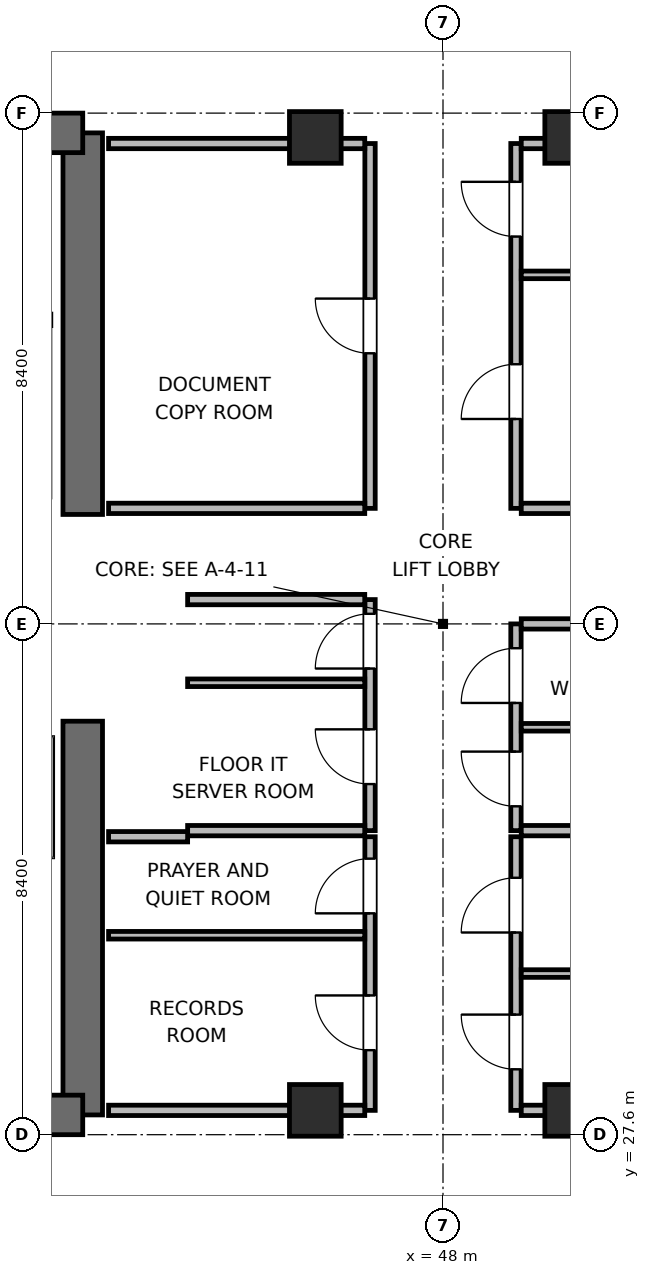
"""IFC4 building model, lengths in metres.
Left out: names, types, materials, properties, quantities, classifications, styles, units other than length and angle.
Written with IfcOpenShell. Run it as: python <this file> out.ifc"""

import sys

from ifc_helpers import new_model, si_unit, direction, frame, frame_2d, origin, origin_2d, place, context, subcontext, project, spatial, rectangle, extrude, element, fill, save


model = new_model("IFC4")
c1 = context("Model", 3, precision=1e-05, world=origin(), true_north=direction((0.0, 1.0)))
c2 = subcontext(c1, "Body", "Model", "MODEL_VIEW")
j1 = project(units=[si_unit("LENGTHUNIT", "METRE"), si_unit("PLANEANGLEUNIT", "RADIAN")], contexts=[c1])
p1 = place(None, origin())
s1 = spatial("IfcSite", under=j1, at=p1, CompositionType="ELEMENT")
p2 = place(p1, origin())
s2 = spatial("IfcBuilding", under=s1, at=p2, CompositionType="ELEMENT")
p3 = place(p2, frame((0.0, 0.0, 231.0)))
s3 = spatial("IfcBuildingStorey", under=s2, at=p3, CompositionType="ELEMENT", Elevation=231.0)
p4 = place(p3, frame((42.075, 27.925, 0.0), z_axis=(0.0, 0.0, 1.0), x_axis=(0.0, 1.0, 0.0)))
e1 = element("IfcWall", 1, at=p4, inside=s3, PredefinedType="SHEAR", context=c2, shape_type="SweptSolid", body=[
    extrude(rectangle(XDim=6.475, YDim=0.65, at=frame_2d((3.237, 0.0))), origin(), (0.0, 0.0, 1.0), 3.9),
])
p5 = place(p3, frame((42.075, 37.8, 0.0), z_axis=(0.0, 0.0, 1.0), x_axis=(0.0, 1.0, 0.0)))
e2 = element("IfcWall", 2, at=p5, inside=s3, PredefinedType="SHEAR", context=c2, shape_type="SweptSolid", body=[
    extrude(rectangle(XDim=6.275, YDim=0.65, at=frame_2d((3.137, 0.0))), origin(), (0.0, 0.0, 1.0), 3.9),
])
p6 = place(p3, frame((32.725, 27.925, 0.0), z_axis=(0.0, 0.0, 1.0), x_axis=(1.0, 0.0, 0.0)))
e3 = element("IfcWall", 3, at=p6, inside=s3, PredefinedType="SHEAR", context=c2, shape_type="SweptSolid", body=[
    extrude(rectangle(XDim=9.35, YDim=0.65, at=frame_2d((4.675, 0.0))), origin(), (0.0, 0.0, 1.0), 3.9),
])
p7 = place(p6, frame((5.025, 0.0, 0.0)))
e4 = element("IfcOpeningElement", 4, at=p7, cuts=e3, PredefinedType="OPENING", context=c2, shape_type="SweptSolid", body=[
    extrude(rectangle(XDim=1.05, YDim=2.04, at=frame_2d((0.525, 1.02))), frame((0.0, 0.335, 0.0), z_axis=(0.0, -1.0, 0.0), x_axis=(1.0, 0.0, 0.0)), (0.0, 0.0, 1.0), 0.67),
])
p8 = place(p3, frame((32.725, 44.075, 0.0), z_axis=(0.0, 0.0, 1.0), x_axis=(1.0, 0.0, 0.0)))
e5 = element("IfcWall", 5, at=p8, inside=s3, PredefinedType="SHEAR", context=c2, shape_type="SweptSolid", body=[
    extrude(rectangle(XDim=9.35, YDim=0.65, at=frame_2d((4.675, 0.0))), origin(), (0.0, 0.0, 1.0), 3.9),
])
p9 = place(p8, frame((1.025, 0.0, 0.0)))
e6 = element("IfcOpeningElement", 6, at=p9, cuts=e5, PredefinedType="OPENING", context=c2, shape_type="SweptSolid", body=[
    extrude(rectangle(XDim=0.95, YDim=2.04, at=frame_2d((0.475, 1.02))), frame((0.0, 0.335, 0.0), z_axis=(0.0, -1.0, 0.0), x_axis=(1.0, 0.0, 0.0)), (0.0, 0.0, 1.0), 0.67),
])
p10 = place(p8, frame((4.275, 0.0, 0.0)))
e7 = element("IfcOpeningElement", 7, at=p10, cuts=e5, PredefinedType="OPENING", context=c2, shape_type="SweptSolid", body=[
    extrude(rectangle(XDim=0.9, YDim=2.02, at=frame_2d((0.45, 1.01))), frame((0.0, 0.335, 0.0), z_axis=(0.0, -1.0, 0.0), x_axis=(1.0, 0.0, 0.0)), (0.0, 0.0, 1.0), 0.67),
])
p11 = place(p8, frame((7.175, 0.0, 0.0)))
e8 = element("IfcOpeningElement", 8, at=p11, cuts=e5, PredefinedType="OPENING", context=c2, shape_type="SweptSolid", body=[
    extrude(rectangle(XDim=0.9, YDim=2.02, at=frame_2d((0.45, 1.01))), frame((0.0, 0.335, 0.0), z_axis=(0.0, -1.0, 0.0), x_axis=(1.0, 0.0, 0.0)), (0.0, 0.0, 1.0), 0.67),
])
for number, where, z_axis, x_axis in (
    (9, (45.9, 28.0, 0.0), (0.0, 0.0, 1.0), (1.0, 0.0, 0.0)),
    (10, (50.1, 28.0, 0.0), (0.0, 0.0, 1.0), (1.0, 0.0, 0.0)),
    (11, (45.9, 44.0, 0.0), (0.0, 0.0, 1.0), (1.0, 0.0, 0.0)),
    (12, (50.1, 44.0, 0.0), (0.0, 0.0, 1.0), (1.0, 0.0, 0.0)),
):
    element("IfcColumn", number, at=place(p3, frame(where, z_axis=z_axis, x_axis=x_axis)), inside=s3, PredefinedType="COLUMN", context=c2, shape_type="SweptSolid", body=[
        extrude(rectangle(XDim=0.85, YDim=0.85, at=origin_2d()), origin(), (0.0, 0.0, 1.0), 3.9),
    ])
p12 = place(p3, frame((46.8, 32.6, 0.0), z_axis=(0.0, 0.0, 1.0), x_axis=(0.0, 1.0, 0.0)))
e13 = element("IfcWall", 13, at=p12, inside=s3, PredefinedType="PARTITIONING", context=c2, shape_type="SweptSolid", body=[
    extrude(rectangle(XDim=3.8, YDim=0.17, at=frame_2d((1.9, 0.0))), origin(), (0.0, 0.0, 1.0), 3.68),
])
p13 = place(p12, frame((0.766, 0.0, 0.0)))
e14 = element("IfcOpeningElement", 14, at=p13, cuts=e13, PredefinedType="OPENING", context=c2, shape_type="SweptSolid", body=[
    extrude(rectangle(XDim=0.9, YDim=2.02, at=frame_2d((0.45, 1.01))), frame((0.0, 0.095, 0.0), z_axis=(0.0, -1.0, 0.0), x_axis=(1.0, 0.0, 0.0)), (0.0, 0.0, 1.0), 0.19),
])
p14 = place(p12, frame((2.666, 0.0, 0.0)))
e15 = element("IfcOpeningElement", 15, at=p14, cuts=e13, PredefinedType="OPENING", context=c2, shape_type="SweptSolid", body=[
    extrude(rectangle(XDim=0.9, YDim=2.02, at=frame_2d((0.45, 1.01))), frame((0.0, 0.095, 0.0), z_axis=(0.0, -1.0, 0.0), x_axis=(1.0, 0.0, 0.0)), (0.0, 0.0, 1.0), 0.19),
])
for number, where, z_axis, x_axis in (
    (16, (43.8, 32.6, 0.0), (0.0, 0.0, 1.0), (1.0, 0.0, 0.0)),
    (17, (43.8, 36.4, 0.0), (0.0, 0.0, 1.0), (1.0, 0.0, 0.0)),
):
    element("IfcWall", number, at=place(p3, frame(where, z_axis=z_axis, x_axis=x_axis)), inside=s3, PredefinedType="PARTITIONING", context=c2, shape_type="SweptSolid", body=[
        extrude(rectangle(XDim=2.913, YDim=0.17, at=frame_2d((1.457, 0.0))), origin(), (0.0, 0.0, 1.0), 3.68),
    ])
p15 = place(p3, frame((43.8, 35.032, 0.0), z_axis=(0.0, 0.0, 1.0), x_axis=(1.0, 0.0, 0.0)))
e18 = element("IfcWall", 18, at=p15, inside=s3, PredefinedType="PARTITIONING", context=c2, shape_type="SweptSolid", body=[
    extrude(rectangle(XDim=2.913, YDim=0.125, at=frame_2d((1.457, 0.0))), origin(), (0.0, 0.0, 1.0), 3.68),
])
p16 = place(p3, frame((49.2, 32.6, 0.0), z_axis=(0.0, 0.0, 1.0), x_axis=(0.0, 1.0, 0.0)))
e19 = element("IfcWall", 19, at=p16, inside=s3, PredefinedType="PARTITIONING", context=c2, shape_type="SweptSolid", body=[
    extrude(rectangle(XDim=3.4, YDim=0.17, at=frame_2d((1.7, 0.0))), origin(), (0.0, 0.0, 1.0), 3.68),
])
p17 = place(p16, frame((0.4, 0.0, 0.0)))
e20 = element("IfcOpeningElement", 20, at=p17, cuts=e19, PredefinedType="OPENING", context=c2, shape_type="SweptSolid", body=[
    extrude(rectangle(XDim=0.9, YDim=2.02, at=frame_2d((0.45, 1.01))), frame((0.0, 0.095, 0.0), z_axis=(0.0, -1.0, 0.0), x_axis=(1.0, 0.0, 0.0)), (0.0, 0.0, 1.0), 0.19),
])
p18 = place(p16, frame((2.1, 0.0, 0.0)))
e21 = element("IfcOpeningElement", 21, at=p18, cuts=e19, PredefinedType="OPENING", context=c2, shape_type="SweptSolid", body=[
    extrude(rectangle(XDim=0.9, YDim=2.02, at=frame_2d((0.45, 1.01))), frame((0.0, 0.095, 0.0), z_axis=(0.0, -1.0, 0.0), x_axis=(1.0, 0.0, 0.0)), (0.0, 0.0, 1.0), 0.19),
])
for number, where, z_axis, x_axis in (
    (22, (49.287, 32.6, 0.0), (0.0, 0.0, 1.0), (1.0, 0.0, 0.0)),
    (23, (49.287, 36.0, 0.0), (0.0, 0.0, 1.0), (1.0, 0.0, 0.0)),
):
    element("IfcWall", number, at=place(p3, frame(where, z_axis=z_axis, x_axis=x_axis)), inside=s3, PredefinedType="PARTITIONING", context=c2, shape_type="SweptSolid", body=[
        extrude(rectangle(XDim=2.913, YDim=0.17, at=frame_2d((1.457, 0.0))), origin(), (0.0, 0.0, 1.0), 3.68),
    ])
p19 = place(p3, frame((49.287, 34.3, 0.0), z_axis=(0.0, 0.0, 1.0), x_axis=(1.0, 0.0, 0.0)))
e24 = element("IfcWall", 24, at=p19, inside=s3, PredefinedType="PARTITIONING", context=c2, shape_type="SweptSolid", body=[
    extrude(rectangle(XDim=2.913, YDim=0.125, at=frame_2d((1.457, 0.0))), origin(), (0.0, 0.0, 1.0), 3.68),
])
p20 = place(p3, frame((46.8, 28.0, 0.0), z_axis=(0.0, 0.0, 1.0), x_axis=(0.0, 1.0, 0.0)))
e25 = element("IfcWall", 25, at=p20, inside=s3, PredefinedType="PARTITIONING", context=c2, shape_type="SweptSolid", body=[
    extrude(rectangle(XDim=4.5, YDim=0.17, at=frame_2d((2.25, 0.0))), origin(), (0.0, 0.0, 1.0), 3.68),
])
p21 = place(p20, frame((0.99, 0.0, 0.0)))
e26 = element("IfcOpeningElement", 26, at=p21, cuts=e25, PredefinedType="OPENING", context=c2, shape_type="SweptSolid", body=[
    extrude(rectangle(XDim=0.9, YDim=2.02, at=frame_2d((0.45, 1.01))), frame((0.0, 0.095, 0.0), z_axis=(0.0, -1.0, 0.0), x_axis=(1.0, 0.0, 0.0)), (0.0, 0.0, 1.0), 0.19),
])
p22 = place(p20, frame((3.24, 0.0, 0.0)))
e27 = element("IfcOpeningElement", 27, at=p22, cuts=e25, PredefinedType="OPENING", context=c2, shape_type="SweptSolid", body=[
    extrude(rectangle(XDim=0.9, YDim=2.02, at=frame_2d((0.45, 1.01))), frame((0.0, 0.095, 0.0), z_axis=(0.0, -1.0, 0.0), x_axis=(1.0, 0.0, 0.0)), (0.0, 0.0, 1.0), 0.19),
])
p23 = place(p3, frame((42.5, 28.0, 0.0), z_axis=(0.0, 0.0, 1.0), x_axis=(1.0, 0.0, 0.0)))
e28 = element("IfcWall", 28, at=p23, inside=s3, PredefinedType="PARTITIONING", context=c2, shape_type="SweptSolid", body=[
    extrude(rectangle(XDim=4.213, YDim=0.17, at=frame_2d((2.106, 0.0))), origin(), (0.0, 0.0, 1.0), 2.765),
])
p24 = place(p3, frame((42.5, 32.5, 0.0), z_axis=(0.0, 0.0, 1.0), x_axis=(1.0, 0.0, 0.0)))
e29 = element("IfcWall", 29, at=p24, inside=s3, PredefinedType="PARTITIONING", context=c2, shape_type="SweptSolid", body=[
    extrude(rectangle(XDim=1.3, YDim=0.17, at=frame_2d((0.65, 0.0))), origin(), (0.0, 0.0, 1.0), 3.68),
])
p25 = place(p3, frame((42.5, 30.88, 0.0), z_axis=(0.0, 0.0, 1.0), x_axis=(1.0, 0.0, 0.0)))
e30 = element("IfcWall", 30, at=p25, inside=s3, PredefinedType="PARTITIONING", context=c2, shape_type="SweptSolid", body=[
    extrude(rectangle(XDim=4.213, YDim=0.125, at=frame_2d((2.106, 0.0))), origin(), (0.0, 0.0, 1.0), 3.68),
])
p26 = place(p3, frame((49.2, 28.0, 0.0), z_axis=(0.0, 0.0, 1.0), x_axis=(0.0, 1.0, 0.0)))
e31 = element("IfcWall", 31, at=p26, inside=s3, PredefinedType="PARTITIONING", context=c2, shape_type="SweptSolid", body=[
    extrude(rectangle(XDim=4.5, YDim=0.17, at=frame_2d((2.25, 0.0))), origin(), (0.0, 0.0, 1.0), 3.68),
])
p27 = place(p26, frame((0.675, 0.0, 0.0)))
e32 = element("IfcOpeningElement", 32, at=p27, cuts=e31, PredefinedType="OPENING", context=c2, shape_type="SweptSolid", body=[
    extrude(rectangle(XDim=0.9, YDim=2.02, at=frame_2d((0.45, 1.01))), frame((0.0, 0.095, 0.0), z_axis=(0.0, -1.0, 0.0), x_axis=(1.0, 0.0, 0.0)), (0.0, 0.0, 1.0), 0.19),
])
p28 = place(p26, frame((2.925, 0.0, 0.0)))
e33 = element("IfcOpeningElement", 33, at=p28, cuts=e31, PredefinedType="OPENING", context=c2, shape_type="SweptSolid", body=[
    extrude(rectangle(XDim=0.9, YDim=2.02, at=frame_2d((0.45, 1.01))), frame((0.0, 0.095, 0.0), z_axis=(0.0, -1.0, 0.0), x_axis=(1.0, 0.0, 0.0)), (0.0, 0.0, 1.0), 0.19),
])
p29 = place(p3, frame((49.287, 28.0, 0.0), z_axis=(0.0, 0.0, 1.0), x_axis=(1.0, 0.0, 0.0)))
e34 = element("IfcWall", 34, at=p29, inside=s3, PredefinedType="PARTITIONING", context=c2, shape_type="SweptSolid", body=[
    extrude(rectangle(XDim=4.213, YDim=0.17, at=frame_2d((2.106, 0.0))), origin(), (0.0, 0.0, 1.0), 2.765),
])
p30 = place(p3, frame((49.287, 30.25, 0.0), z_axis=(0.0, 0.0, 1.0), x_axis=(1.0, 0.0, 0.0)))
e35 = element("IfcWall", 35, at=p30, inside=s3, PredefinedType="PARTITIONING", context=c2, shape_type="SweptSolid", body=[
    extrude(rectangle(XDim=4.213, YDim=0.125, at=frame_2d((2.106, 0.0))), origin(), (0.0, 0.0, 1.0), 3.68),
])
p31 = place(p3, frame((46.8, 37.9, 0.0), z_axis=(0.0, 0.0, 1.0), x_axis=(0.0, 1.0, 0.0)))
e36 = element("IfcWall", 36, at=p31, inside=s3, PredefinedType="PARTITIONING", context=c2, shape_type="SweptSolid", body=[
    extrude(rectangle(XDim=6.0, YDim=0.17, at=frame_2d((3.0, 0.0))), origin(), (0.0, 0.0, 1.0), 3.68),
])
p32 = place(p31, frame((2.55, 0.0, 0.0)))
e37 = element("IfcOpeningElement", 37, at=p32, cuts=e36, PredefinedType="OPENING", context=c2, shape_type="SweptSolid", body=[
    extrude(rectangle(XDim=0.9, YDim=2.02, at=frame_2d((0.45, 1.01))), frame((0.0, 0.095, 0.0), z_axis=(0.0, -1.0, 0.0), x_axis=(1.0, 0.0, 0.0)), (0.0, 0.0, 1.0), 0.19),
])
p33 = place(p3, frame((42.5, 37.9, 0.0), z_axis=(0.0, 0.0, 1.0), x_axis=(1.0, 0.0, 0.0)))
e38 = element("IfcWall", 38, at=p33, inside=s3, PredefinedType="PARTITIONING", context=c2, shape_type="SweptSolid", body=[
    extrude(rectangle(XDim=4.213, YDim=0.17, at=frame_2d((2.106, 0.0))), origin(), (0.0, 0.0, 1.0), 3.68),
])
p34 = place(p3, frame((42.5, 43.9, 0.0), z_axis=(0.0, 0.0, 1.0), x_axis=(1.0, 0.0, 0.0)))
e39 = element("IfcWall", 39, at=p34, inside=s3, PredefinedType="PARTITIONING", context=c2, shape_type="SweptSolid", body=[
    extrude(rectangle(XDim=4.213, YDim=0.17, at=frame_2d((2.106, 0.0))), origin(), (0.0, 0.0, 1.0), 2.765),
])
p35 = place(p3, frame((49.2, 37.9, 0.0), z_axis=(0.0, 0.0, 1.0), x_axis=(0.0, 1.0, 0.0)))
e40 = element("IfcWall", 40, at=p35, inside=s3, PredefinedType="PARTITIONING", context=c2, shape_type="SweptSolid", body=[
    extrude(rectangle(XDim=6.0, YDim=0.17, at=frame_2d((3.0, 0.0))), origin(), (0.0, 0.0, 1.0), 3.68),
])
p36 = place(p35, frame((1.47, 0.0, 0.0)))
e41 = element("IfcOpeningElement", 41, at=p36, cuts=e40, PredefinedType="OPENING", context=c2, shape_type="SweptSolid", body=[
    extrude(rectangle(XDim=0.9, YDim=2.02, at=frame_2d((0.45, 1.01))), frame((0.0, 0.095, 0.0), z_axis=(0.0, -1.0, 0.0), x_axis=(1.0, 0.0, 0.0)), (0.0, 0.0, 1.0), 0.19),
])
p37 = place(p35, frame((4.47, 0.0, 0.0)))
e42 = element("IfcOpeningElement", 42, at=p37, cuts=e40, PredefinedType="OPENING", context=c2, shape_type="SweptSolid", body=[
    extrude(rectangle(XDim=0.9, YDim=2.02, at=frame_2d((0.45, 1.01))), frame((0.0, 0.095, 0.0), z_axis=(0.0, -1.0, 0.0), x_axis=(1.0, 0.0, 0.0)), (0.0, 0.0, 1.0), 0.19),
])
p38 = place(p3, frame((49.287, 37.9, 0.0), z_axis=(0.0, 0.0, 1.0), x_axis=(1.0, 0.0, 0.0)))
e43 = element("IfcWall", 43, at=p38, inside=s3, PredefinedType="PARTITIONING", context=c2, shape_type="SweptSolid", body=[
    extrude(rectangle(XDim=4.113, YDim=0.17, at=frame_2d((2.056, 0.0))), origin(), (0.0, 0.0, 1.0), 3.68),
])
p39 = place(p3, frame((49.287, 43.9, 0.0), z_axis=(0.0, 0.0, 1.0), x_axis=(1.0, 0.0, 0.0)))
e44 = element("IfcWall", 44, at=p39, inside=s3, PredefinedType="PARTITIONING", context=c2, shape_type="SweptSolid", body=[
    extrude(rectangle(XDim=4.113, YDim=0.17, at=frame_2d((2.056, 0.0))), origin(), (0.0, 0.0, 1.0), 2.765),
])
p40 = place(p3, frame((49.287, 41.74, 0.0), z_axis=(0.0, 0.0, 1.0), x_axis=(1.0, 0.0, 0.0)))
e45 = element("IfcWall", 45, at=p40, inside=s3, PredefinedType="PARTITIONING", context=c2, shape_type="SweptSolid", body=[
    extrude(rectangle(XDim=4.113, YDim=0.125, at=frame_2d((2.056, 0.0))), origin(), (0.0, 0.0, 1.0), 3.68),
])
p41 = place(p13, origin())
e46 = element("IfcDoor", 46, at=p41, inside=s3, OperationType="SINGLE_SWING_RIGHT", PredefinedType="DOOR", context=c2, shape_type="SweptSolid", body=[
    extrude(rectangle(XDim=0.9, YDim=2.02, at=frame_2d((0.45, 1.01))), frame((0.0, 0.025, 0.0), z_axis=(0.0, -1.0, 0.0), x_axis=(1.0, 0.0, 0.0)), (0.0, 0.0, 1.0), 0.05),
])
fill(e14, e46)
p42 = place(p14, origin())
e47 = element("IfcDoor", 47, at=p42, inside=s3, OperationType="SINGLE_SWING_LEFT", PredefinedType="DOOR", context=c2, shape_type="SweptSolid", body=[
    extrude(rectangle(XDim=0.9, YDim=2.02, at=frame_2d((0.45, 1.01))), frame((0.0, 0.025, 0.0), z_axis=(0.0, -1.0, 0.0), x_axis=(1.0, 0.0, 0.0)), (0.0, 0.0, 1.0), 0.05),
])
fill(e15, e47)
p43 = place(p17, origin())
e48 = element("IfcDoor", 48, at=p43, inside=s3, OperationType="SINGLE_SWING_RIGHT", PredefinedType="DOOR", context=c2, shape_type="SweptSolid", body=[
    extrude(rectangle(XDim=0.9, YDim=2.02, at=frame_2d((0.45, 1.01))), frame((0.0, 0.025, 0.0), z_axis=(0.0, -1.0, 0.0), x_axis=(1.0, 0.0, 0.0)), (0.0, 0.0, 1.0), 0.05),
])
fill(e20, e48)
p44 = place(p18, origin())
e49 = element("IfcDoor", 49, at=p44, inside=s3, OperationType="SINGLE_SWING_LEFT", PredefinedType="DOOR", context=c2, shape_type="SweptSolid", body=[
    extrude(rectangle(XDim=0.9, YDim=2.02, at=frame_2d((0.45, 1.01))), frame((0.0, 0.025, 0.0), z_axis=(0.0, -1.0, 0.0), x_axis=(1.0, 0.0, 0.0)), (0.0, 0.0, 1.0), 0.05),
])
fill(e21, e49)
p45 = place(p21, origin())
e50 = element("IfcDoor", 50, at=p45, inside=s3, OperationType="SINGLE_SWING_RIGHT", PredefinedType="DOOR", context=c2, shape_type="SweptSolid", body=[
    extrude(rectangle(XDim=0.9, YDim=2.02, at=frame_2d((0.45, 1.01))), frame((0.0, 0.025, 0.0), z_axis=(0.0, -1.0, 0.0), x_axis=(1.0, 0.0, 0.0)), (0.0, 0.0, 1.0), 0.05),
])
fill(e26, e50)
p46 = place(p22, origin())
e51 = element("IfcDoor", 51, at=p46, inside=s3, OperationType="SINGLE_SWING_LEFT", PredefinedType="DOOR", context=c2, shape_type="SweptSolid", body=[
    extrude(rectangle(XDim=0.9, YDim=2.02, at=frame_2d((0.45, 1.01))), frame((0.0, 0.025, 0.0), z_axis=(0.0, -1.0, 0.0), x_axis=(1.0, 0.0, 0.0)), (0.0, 0.0, 1.0), 0.05),
])
fill(e27, e51)
p47 = place(p27, origin())
e52 = element("IfcDoor", 52, at=p47, inside=s3, OperationType="SINGLE_SWING_RIGHT", PredefinedType="DOOR", context=c2, shape_type="SweptSolid", body=[
    extrude(rectangle(XDim=0.9, YDim=2.02, at=frame_2d((0.45, 1.01))), frame((0.0, 0.025, 0.0), z_axis=(0.0, -1.0, 0.0), x_axis=(1.0, 0.0, 0.0)), (0.0, 0.0, 1.0), 0.05),
])
fill(e32, e52)
p48 = place(p28, origin())
e53 = element("IfcDoor", 53, at=p48, inside=s3, OperationType="SINGLE_SWING_LEFT", PredefinedType="DOOR", context=c2, shape_type="SweptSolid", body=[
    extrude(rectangle(XDim=0.9, YDim=2.02, at=frame_2d((0.45, 1.01))), frame((0.0, 0.025, 0.0), z_axis=(0.0, -1.0, 0.0), x_axis=(1.0, 0.0, 0.0)), (0.0, 0.0, 1.0), 0.05),
])
fill(e33, e53)
p49 = place(p32, origin())
e54 = element("IfcDoor", 54, at=p49, inside=s3, OperationType="SINGLE_SWING_RIGHT", PredefinedType="DOOR", context=c2, shape_type="SweptSolid", body=[
    extrude(rectangle(XDim=0.9, YDim=2.02, at=frame_2d((0.45, 1.01))), frame((0.0, 0.025, 0.0), z_axis=(0.0, -1.0, 0.0), x_axis=(1.0, 0.0, 0.0)), (0.0, 0.0, 1.0), 0.05),
])
fill(e37, e54)
p50 = place(p36, origin())
e55 = element("IfcDoor", 55, at=p50, inside=s3, OperationType="SINGLE_SWING_LEFT", PredefinedType="DOOR", context=c2, shape_type="SweptSolid", body=[
    extrude(rectangle(XDim=0.9, YDim=2.02, at=frame_2d((0.45, 1.01))), frame((0.0, 0.025, 0.0), z_axis=(0.0, -1.0, 0.0), x_axis=(1.0, 0.0, 0.0)), (0.0, 0.0, 1.0), 0.05),
])
fill(e41, e55)
p51 = place(p37, origin())
e56 = element("IfcDoor", 56, at=p51, inside=s3, OperationType="SINGLE_SWING_RIGHT", PredefinedType="DOOR", context=c2, shape_type="SweptSolid", body=[
    extrude(rectangle(XDim=0.9, YDim=2.02, at=frame_2d((0.45, 1.01))), frame((0.0, 0.025, 0.0), z_axis=(0.0, -1.0, 0.0), x_axis=(1.0, 0.0, 0.0)), (0.0, 0.0, 1.0), 0.05),
])
fill(e42, e56)
save(model, sys.argv[1])
